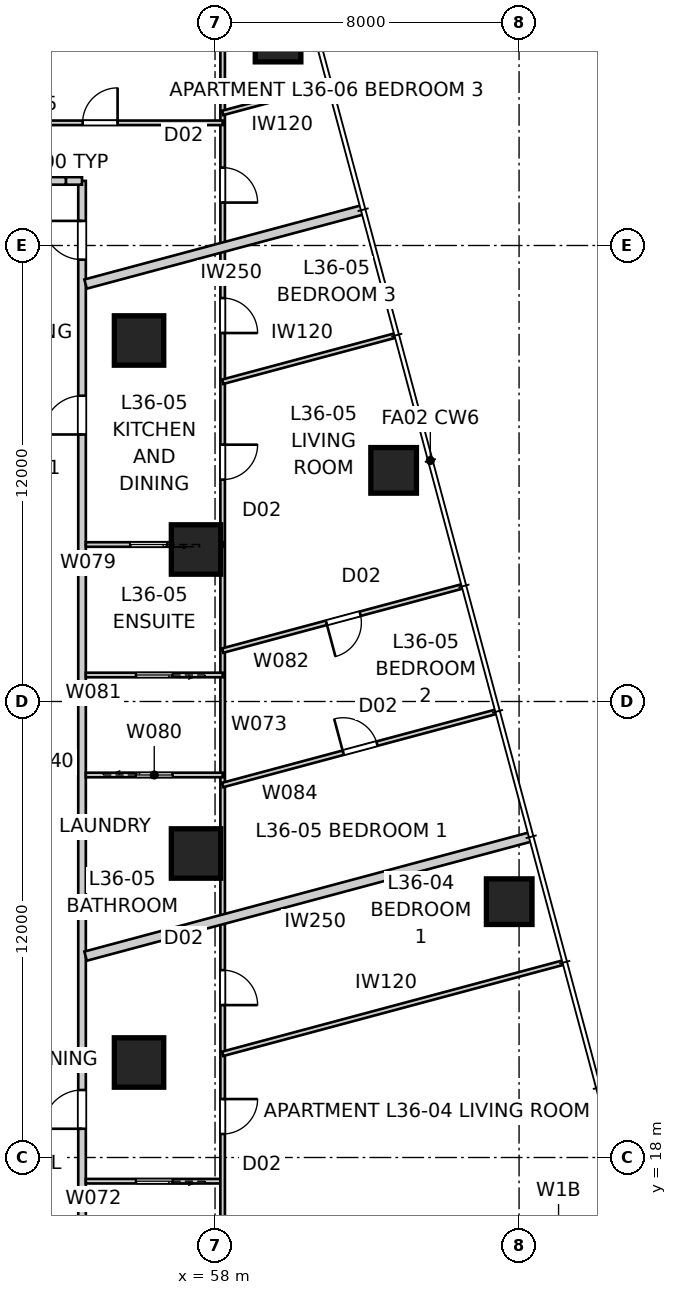
"""IFC4 building model, lengths in metres.
Left out: names, types, materials, properties, quantities, classifications, styles, units other than length and angle.
Written with IfcOpenShell. Run it as: python <this file> out.ifc"""

import sys

from ifc_helpers import new_model, si_unit, direction, frame, frame_2d, origin, origin_2d, place, context, subcontext, project, spatial, rectangle, extrude, element, fill, save


model = new_model("IFC4")
c1 = context("Model", 3, precision=1e-05, world=origin(), true_north=direction((0.0, 1.0)))
c2 = subcontext(c1, "Body", "Model", "MODEL_VIEW")
j1 = project(units=[si_unit("LENGTHUNIT", "METRE"), si_unit("PLANEANGLEUNIT", "RADIAN")], contexts=[c1])
p1 = place(None, origin())
s1 = spatial("IfcSite", under=j1, at=p1, CompositionType="ELEMENT")
p2 = place(p1, origin())
s2 = spatial("IfcBuilding", under=s1, at=p2, CompositionType="ELEMENT")
p3 = place(p2, frame((0.0, 0.0, 132.0)))
s3 = spatial("IfcBuildingStorey", under=s2, at=p3, CompositionType="ELEMENT", Elevation=132.0)
for number, where, z_axis, x_axis in (
    (1, (65.74, 24.733, 0.0), (0.0, 0.0, 1.0), (1.0, 0.0, 0.0)),
    (2, (62.699, 36.082, 0.0), (0.0, 0.0, 1.0), (1.0, 0.0, 0.0)),
    (3, (59.658, 47.432, 0.0), (0.0, 0.0, 1.0), (1.0, 0.0, 0.0)),
):
    element("IfcColumn", number, at=place(p3, frame(where, z_axis=z_axis, x_axis=x_axis)), inside=s3, PredefinedType="COLUMN", context=c2, shape_type="SweptSolid", body=[
        extrude(rectangle(XDim=1.2, YDim=1.2, at=origin_2d()), origin(), (0.0, 0.0, 1.0), 3.4),
    ])
for number, where, z_axis, x_axis in (
    (4, (57.5, 26.0, 0.0), (0.0, 0.0, 1.0), (1.0, 0.0, 0.0)),
    (5, (57.5, 34.0, 0.0), (0.0, 0.0, 1.0), (1.0, 0.0, 0.0)),
    (6, (56.0, 39.5, 0.0), (0.0, 0.0, 1.0), (1.0, 0.0, 0.0)),
    (7, (56.0, 20.5, 0.0), (0.0, 0.0, 1.0), (1.0, 0.0, 0.0)),
):
    element("IfcColumn", number, at=place(p3, frame(where, z_axis=z_axis, x_axis=x_axis)), inside=s3, PredefinedType="COLUMN", context=c2, shape_type="SweptSolid", body=[
        extrude(rectangle(XDim=1.3, YDim=1.3, at=origin_2d()), origin(), (0.0, 0.0, 1.0), 3.4),
    ])
p4 = place(p3, frame((65.107, 15.504, 0.0), z_axis=(0.0, 0.0, 1.0), x_axis=(0.965934430412, 0.258786931944, 0.0)))
e8 = element("IfcWall", 8, at=p4, inside=s3, PredefinedType="SOLIDWALL", context=c2, shape_type="SweptSolid", body=[
    extrude(rectangle(XDim=4.0, YDim=0.2, at=frame_2d((2.0, 0.0))), origin(), (0.0, 0.0, 1.0), 3.25),
])
p5 = place(p4, frame((1.0, 0.0, 0.45)))
e9 = element("IfcOpeningElement", 9, at=p5, cuts=e8, PredefinedType="OPENING", context=c2, shape_type="SweptSolid", body=[
    extrude(rectangle(XDim=2.0, YDim=1.8, at=frame_2d((1.0, 0.9))), frame((0.0, 0.11, 0.0), z_axis=(0.0, -1.0, 0.0), x_axis=(1.0, 0.0, 0.0)), (0.0, 0.0, 1.0), 0.22),
])
p6 = place(p3, frame((54.5, 15.5, 0.0), z_axis=(0.0, 0.0, 1.0), x_axis=(0.0, 1.0, 0.0)))
e10 = element("IfcWall", 10, at=p6, inside=s3, PredefinedType="PARTITIONING", context=c2, shape_type="SweptSolid", body=[
    extrude(rectangle(XDim=28.2, YDim=0.2, at=frame_2d((14.1, 0.0))), origin(), (0.0, 0.0, 1.0), 3.25),
])
p7 = place(p6, frame((21.527, 0.0, 0.0)))
e11 = element("IfcOpeningElement", 11, at=p7, cuts=e10, PredefinedType="OPENING", context=c2, shape_type="SweptSolid", body=[
    extrude(rectangle(XDim=1.02, YDim=2.34, at=frame_2d((0.51, 1.17))), frame((0.0, 0.11, 0.0), z_axis=(0.0, -1.0, 0.0), x_axis=(1.0, 0.0, 0.0)), (0.0, 0.0, 1.0), 0.22),
])
p8 = place(p6, frame((3.256, 0.0, 0.0)))
e12 = element("IfcOpeningElement", 12, at=p8, cuts=e10, PredefinedType="OPENING", context=c2, shape_type="SweptSolid", body=[
    extrude(rectangle(XDim=1.02, YDim=2.1, at=frame_2d((0.51, 1.05))), frame((0.0, 0.11, 0.0), z_axis=(0.0, -1.0, 0.0), x_axis=(1.0, 0.0, 0.0)), (0.0, 0.0, 1.0), 0.22),
])
p9 = place(p6, frame((26.127, 0.0, 0.0)))
e13 = element("IfcOpeningElement", 13, at=p9, cuts=e10, PredefinedType="OPENING", context=c2, shape_type="SweptSolid", body=[
    extrude(rectangle(XDim=1.02, YDim=2.34, at=frame_2d((0.51, 1.17))), frame((0.0, 0.11, 0.0), z_axis=(0.0, -1.0, 0.0), x_axis=(1.0, 0.0, 0.0)), (0.0, 0.0, 1.0), 0.22),
])
p10 = place(p3, frame((54.5, 43.7, 0.0), z_axis=(0.0, 0.0, 1.0), x_axis=(-1.0, 0.0, 0.0)))
e14 = element("IfcWall", 14, at=p10, inside=s3, PredefinedType="PARTITIONING", context=c2, shape_type="SweptSolid", body=[
    extrude(rectangle(XDim=0.426, YDim=0.2, at=frame_2d((0.213, 0.0))), origin(), (0.0, 0.0, 1.0), 3.25),
])
p11 = place(p3, frame((54.074, 43.7, 0.0), z_axis=(0.0, 0.0, 1.0), x_axis=(-1.0, 0.0, 0.0)))
e15 = element("IfcWall", 15, at=p11, inside=s3, PredefinedType="PARTITIONING", context=c2, shape_type="SweptSolid", body=[
    extrude(rectangle(XDim=1.554, YDim=0.2, at=frame_2d((0.777, 0.0))), origin(), (0.0, 0.0, 1.0), 2.721),
])
p12 = place(p3, frame((66.318, 26.44, 0.0), z_axis=(0.0, 0.0, 1.0), x_axis=(-0.965924438766, -0.258824223352, 0.0)))
e16 = element("IfcWall", 16, at=p12, inside=s3, PredefinedType="PARTITIONING", context=c2, shape_type="SweptSolid", body=[
    extrude(rectangle(XDim=12.138, YDim=0.25, at=frame_2d((6.069, 0.0))), origin(), (0.0, 0.0, 1.0), 3.25),
])
p13 = place(p3, frame((61.896, 42.942, 0.0), z_axis=(0.0, 0.0, 1.0), x_axis=(-0.965924988656, -0.258822171171, 0.0)))
e17 = element("IfcWall", 17, at=p13, inside=s3, PredefinedType="PARTITIONING", context=c2, shape_type="SweptSolid", body=[
    extrude(rectangle(XDim=7.56, YDim=0.25, at=frame_2d((3.78, 0.0))), origin(), (0.0, 0.0, 1.0), 3.25),
])
p14 = place(p3, frame((58.2, 17.377, 0.0), z_axis=(0.0, 0.0, 1.0), x_axis=(-1.0, 0.0, 0.0)))
e18 = element("IfcWall", 18, at=p14, inside=s3, PredefinedType="PARTITIONING", context=c2, shape_type="SweptSolid", body=[
    extrude(rectangle(XDim=3.6, YDim=0.12, at=frame_2d((1.8, 0.0))), origin(), (0.0, 0.0, 1.0), 3.25),
])
p15 = place(p14, frame((1.32, 0.0, 0.0)))
e19 = element("IfcOpeningElement", 19, at=p15, cuts=e18, PredefinedType="OPENING", context=c2, shape_type="SweptSolid", body=[
    extrude(rectangle(XDim=0.96, YDim=2.1, at=frame_2d((0.48, 1.05))), frame((0.0, 0.07, 0.0), z_axis=(0.0, -1.0, 0.0), x_axis=(1.0, 0.0, 0.0)), (0.0, 0.0, 1.0), 0.14),
])
p16 = place(p3, frame((58.2, 48.2, 0.0), z_axis=(0.0, 0.0, 1.0), x_axis=(0.0, -1.0, 0.0)))
e20 = element("IfcWall", 20, at=p16, inside=s3, PredefinedType="PARTITIONING", context=c2, shape_type="SweptSolid", body=[
    extrude(rectangle(XDim=33.512, YDim=0.12, at=frame_2d((16.756, 0.0))), origin(), (0.0, 0.0, 1.0), 2.637),
])
p17 = place(p16, frame((11.441, 0.0, 0.0)))
e21 = element("IfcOpeningElement", 21, at=p17, cuts=e20, PredefinedType="OPENING", context=c2, shape_type="SweptSolid", body=[
    extrude(rectangle(XDim=0.92, YDim=2.34, at=frame_2d((0.46, 1.17))), frame((0.0, 0.07, 0.0), z_axis=(0.0, -1.0, 0.0), x_axis=(1.0, 0.0, 0.0)), (0.0, 0.0, 1.0), 0.14),
])
p18 = place(p16, frame((7.583, 0.0, 0.0)))
e22 = element("IfcOpeningElement", 22, at=p18, cuts=e20, PredefinedType="OPENING", context=c2, shape_type="SweptSolid", body=[
    extrude(rectangle(XDim=0.92, YDim=2.34, at=frame_2d((0.46, 1.17))), frame((0.0, 0.07, 0.0), z_axis=(0.0, -1.0, 0.0), x_axis=(1.0, 0.0, 0.0)), (0.0, 0.0, 1.0), 0.14),
])
p19 = place(p16, frame((25.269, 0.0, 0.0)))
e23 = element("IfcOpeningElement", 23, at=p19, cuts=e20, PredefinedType="OPENING", context=c2, shape_type="SweptSolid", body=[
    extrude(rectangle(XDim=0.92, YDim=2.34, at=frame_2d((0.46, 1.17))), frame((0.0, 0.07, 0.0), z_axis=(0.0, -1.0, 0.0), x_axis=(1.0, 0.0, 0.0)), (0.0, 0.0, 1.0), 0.14),
])
p20 = place(p16, frame((28.662, 0.0, 0.0)))
e24 = element("IfcOpeningElement", 24, at=p20, cuts=e20, PredefinedType="OPENING", context=c2, shape_type="SweptSolid", body=[
    extrude(rectangle(XDim=0.92, YDim=2.34, at=frame_2d((0.46, 1.17))), frame((0.0, 0.07, 0.0), z_axis=(0.0, -1.0, 0.0), x_axis=(1.0, 0.0, 0.0)), (0.0, 0.0, 1.0), 0.14),
])
p21 = place(p16, frame((4.15, 0.0, 0.0)))
e25 = element("IfcOpeningElement", 25, at=p21, cuts=e20, PredefinedType="OPENING", context=c2, shape_type="SweptSolid", body=[
    extrude(rectangle(XDim=0.92, YDim=2.34, at=frame_2d((0.46, 1.17))), frame((0.0, 0.07, 0.0), z_axis=(0.0, -1.0, 0.0), x_axis=(1.0, 0.0, 0.0)), (0.0, 0.0, 1.0), 0.14),
])
p22 = place(p3, frame((58.2, 20.728, 0.0), z_axis=(0.0, 0.0, 1.0), x_axis=(0.965925974596, 0.258818491613, 0.0)))
e26 = element("IfcWall", 26, at=p22, inside=s3, PredefinedType="PARTITIONING", context=c2, shape_type="SweptSolid", body=[
    extrude(rectangle(XDim=9.28, YDim=0.12, at=frame_2d((4.64, 0.0))), origin(), (0.0, 0.0, 1.0), 2.721),
])
p23 = place(p3, frame((58.2, 34.131, 0.0), z_axis=(0.0, 0.0, 1.0), x_axis=(-1.0, 0.0, 0.0)))
e27 = element("IfcWall", 27, at=p23, inside=s3, PredefinedType="PARTITIONING", context=c2, shape_type="SweptSolid", body=[
    extrude(rectangle(XDim=3.6, YDim=0.12, at=frame_2d((1.8, 0.0))), origin(), (0.0, 0.0, 1.0), 3.25),
])
p24 = place(p23, frame((1.47, 0.0, 0.0)))
e28 = element("IfcOpeningElement", 28, at=p24, cuts=e27, PredefinedType="OPENING", context=c2, shape_type="SweptSolid", body=[
    extrude(rectangle(XDim=0.96, YDim=2.1, at=frame_2d((0.48, 1.05))), frame((0.0, 0.07, 0.0), z_axis=(0.0, -1.0, 0.0), x_axis=(1.0, 0.0, 0.0)), (0.0, 0.0, 1.0), 0.14),
])
p25 = place(p3, frame((54.6, 28.066, 0.0), z_axis=(0.0, 0.0, 1.0), x_axis=(1.0, 0.0, 0.0)))
e29 = element("IfcWall", 29, at=p25, inside=s3, PredefinedType="PARTITIONING", context=c2, shape_type="SweptSolid", body=[
    extrude(rectangle(XDim=3.6, YDim=0.12, at=frame_2d((1.8, 0.0))), origin(), (0.0, 0.0, 1.0), 3.25),
])
p26 = place(p25, frame((1.32, 0.0, 0.0)))
e30 = element("IfcOpeningElement", 30, at=p26, cuts=e29, PredefinedType="OPENING", context=c2, shape_type="SweptSolid", body=[
    extrude(rectangle(XDim=0.96, YDim=2.1, at=frame_2d((0.48, 1.05))), frame((0.0, 0.07, 0.0), z_axis=(0.0, -1.0, 0.0), x_axis=(1.0, 0.0, 0.0)), (0.0, 0.0, 1.0), 0.14),
])
p27 = place(p3, frame((58.2, 30.698, 0.0), z_axis=(0.0, 0.0, 1.0), x_axis=(-1.0, 0.0, 0.0)))
e31 = element("IfcWall", 31, at=p27, inside=s3, PredefinedType="PARTITIONING", context=c2, shape_type="SweptSolid", body=[
    extrude(rectangle(XDim=3.6, YDim=0.12, at=frame_2d((1.8, 0.0))), origin(), (0.0, 0.0, 1.0), 3.25),
])
p28 = place(p27, frame((1.32, 0.0, 0.0)))
e32 = element("IfcOpeningElement", 32, at=p28, cuts=e31, PredefinedType="OPENING", context=c2, shape_type="SweptSolid", body=[
    extrude(rectangle(XDim=0.96, YDim=2.1, at=frame_2d((0.48, 1.05))), frame((0.0, 0.07, 0.0), z_axis=(0.0, -1.0, 0.0), x_axis=(1.0, 0.0, 0.0)), (0.0, 0.0, 1.0), 0.14),
])
p29 = place(p3, frame((64.511, 33.031, 0.0), z_axis=(0.0, 0.0, 1.0), x_axis=(-0.96591852682, -0.258846285554, 0.0)))
e33 = element("IfcWall", 33, at=p29, inside=s3, PredefinedType="PARTITIONING", context=c2, shape_type="SweptSolid", body=[
    extrude(rectangle(XDim=6.533, YDim=0.12, at=frame_2d((3.267, 0.0))), origin(), (0.0, 0.0, 1.0), 3.25),
])
p30 = place(p29, frame((2.787, 0.0, 0.0)))
e34 = element("IfcOpeningElement", 34, at=p30, cuts=e33, PredefinedType="OPENING", context=c2, shape_type="SweptSolid", body=[
    extrude(rectangle(XDim=0.92, YDim=2.34, at=frame_2d((0.46, 1.17))), frame((0.0, 0.07, 0.0), z_axis=(0.0, -1.0, 0.0), x_axis=(1.0, 0.0, 0.0)), (0.0, 0.0, 1.0), 0.14),
])
p31 = place(p3, frame((58.2, 38.414, 0.0), z_axis=(0.0, 0.0, 1.0), x_axis=(0.965928353663, 0.258809612631, 0.0)))
e35 = element("IfcWall", 35, at=p31, inside=s3, PredefinedType="PARTITIONING", context=c2, shape_type="SweptSolid", body=[
    extrude(rectangle(XDim=4.702, YDim=0.12, at=frame_2d((2.351, 0.0))), origin(), (0.0, 0.0, 1.0), 3.25),
])
p32 = place(p3, frame((58.2, 27.802, 0.0), z_axis=(0.0, 0.0, 1.0), x_axis=(0.965925814813, 0.258819087933, 0.0)))
e36 = element("IfcWall", 36, at=p32, inside=s3, PredefinedType="PARTITIONING", context=c2, shape_type="SweptSolid", body=[
    extrude(rectangle(XDim=7.449, YDim=0.12, at=frame_2d((3.725, 0.0))), origin(), (0.0, 0.0, 1.0), 3.25),
])
p33 = place(p32, frame((3.284, 0.0, 0.0)))
e37 = element("IfcOpeningElement", 37, at=p33, cuts=e36, PredefinedType="OPENING", context=c2, shape_type="SweptSolid", body=[
    extrude(rectangle(XDim=0.92, YDim=2.34, at=frame_2d((0.46, 1.17))), frame((0.0, 0.07, 0.0), z_axis=(0.0, -1.0, 0.0), x_axis=(1.0, 0.0, 0.0)), (0.0, 0.0, 1.0), 0.14),
])
p34 = place(p3, frame((51.751, 45.228, 0.0), z_axis=(0.0, 0.0, 1.0), x_axis=(1.0, 0.0, 0.0)))
e38 = element("IfcWall", 38, at=p34, inside=s3, PredefinedType="PARTITIONING", context=c2, shape_type="SweptSolid", body=[
    extrude(rectangle(XDim=6.449, YDim=0.12, at=frame_2d((3.225, 0.0))), origin(), (0.0, 0.0, 1.0), 3.25),
])
p35 = place(p34, frame((2.764, 0.0, 0.0)))
e39 = element("IfcOpeningElement", 39, at=p35, cuts=e38, PredefinedType="OPENING", context=c2, shape_type="SweptSolid", body=[
    extrude(rectangle(XDim=0.92, YDim=2.34, at=frame_2d((0.46, 1.17))), frame((0.0, 0.07, 0.0), z_axis=(0.0, -1.0, 0.0), x_axis=(1.0, 0.0, 0.0)), (0.0, 0.0, 1.0), 0.14),
])
p36 = place(p3, frame((60.974, 46.231, 0.0), z_axis=(0.0, 0.0, 1.0), x_axis=(-0.965929456086, -0.258805498136, 0.0)))
e40 = element("IfcWall", 40, at=p36, inside=s3, PredefinedType="PARTITIONING", context=c2, shape_type="SweptSolid", body=[
    extrude(rectangle(XDim=2.872, YDim=0.12, at=frame_2d((1.436, 0.0))), origin(), (0.0, 0.0, 1.0), 3.25),
])
p37 = place(p7, origin())
e41 = element("IfcDoor", 41, at=p37, inside=s3, OperationType="SINGLE_SWING_LEFT", PredefinedType="DOOR", context=c2, shape_type="SweptSolid", body=[
    extrude(rectangle(XDim=1.02, YDim=2.34, at=frame_2d((0.51, 1.17))), frame((0.0, 0.025, 0.0), z_axis=(0.0, -1.0, 0.0), x_axis=(1.0, 0.0, 0.0)), (0.0, 0.0, 1.0), 0.05),
])
fill(e11, e41)
p38 = place(p8, origin())
e42 = element("IfcDoor", 42, at=p38, inside=s3, OperationType="SINGLE_SWING_LEFT", PredefinedType="DOOR", context=c2, shape_type="SweptSolid", body=[
    extrude(rectangle(XDim=1.02, YDim=2.1, at=frame_2d((0.51, 1.05))), frame((0.0, 0.025, 0.0), z_axis=(0.0, -1.0, 0.0), x_axis=(1.0, 0.0, 0.0)), (0.0, 0.0, 1.0), 0.05),
])
fill(e12, e42)
p39 = place(p9, origin())
e43 = element("IfcDoor", 43, at=p39, inside=s3, OperationType="SINGLE_SWING_RIGHT", PredefinedType="DOOR", context=c2, shape_type="SweptSolid", body=[
    extrude(rectangle(XDim=1.02, YDim=2.34, at=frame_2d((0.51, 1.17))), frame((0.0, 0.025, 0.0), z_axis=(0.0, -1.0, 0.0), x_axis=(1.0, 0.0, 0.0)), (0.0, 0.0, 1.0), 0.05),
])
fill(e13, e43)
p40 = place(p17, origin())
e44 = element("IfcDoor", 44, at=p40, inside=s3, OperationType="SINGLE_SWING_LEFT", PredefinedType="DOOR", context=c2, shape_type="SweptSolid", body=[
    extrude(rectangle(XDim=0.92, YDim=2.34, at=frame_2d((0.46, 1.17))), frame((0.0, 0.025, 0.0), z_axis=(0.0, -1.0, 0.0), x_axis=(1.0, 0.0, 0.0)), (0.0, 0.0, 1.0), 0.05),
])
fill(e21, e44)
p41 = place(p24, origin())
e45 = element("IfcDoor", 45, at=p41, inside=s3, OperationType="SLIDING_TO_LEFT", PredefinedType="DOOR", context=c2, shape_type="SweptSolid", body=[
    extrude(rectangle(XDim=0.96, YDim=2.1, at=frame_2d((0.48, 1.05))), frame((0.0, 0.025, 0.0), z_axis=(0.0, -1.0, 0.0), x_axis=(1.0, 0.0, 0.0)), (0.0, 0.0, 1.0), 0.05),
])
fill(e28, e45)
p42 = place(p18, origin())
e46 = element("IfcDoor", 46, at=p42, inside=s3, OperationType="SINGLE_SWING_RIGHT", PredefinedType="DOOR", context=c2, shape_type="SweptSolid", body=[
    extrude(rectangle(XDim=0.92, YDim=2.34, at=frame_2d((0.46, 1.17))), frame((0.0, 0.025, 0.0), z_axis=(0.0, -1.0, 0.0), x_axis=(1.0, 0.0, 0.0)), (0.0, 0.0, 1.0), 0.05),
])
fill(e22, e46)
p43 = place(p15, origin())
e47 = element("IfcDoor", 47, at=p43, inside=s3, OperationType="SLIDING_TO_LEFT", PredefinedType="DOOR", context=c2, shape_type="SweptSolid", body=[
    extrude(rectangle(XDim=0.96, YDim=2.1, at=frame_2d((0.48, 1.05))), frame((0.0, 0.025, 0.0), z_axis=(0.0, -1.0, 0.0), x_axis=(1.0, 0.0, 0.0)), (0.0, 0.0, 1.0), 0.05),
])
fill(e19, e47)
p44 = place(p19, origin())
e48 = element("IfcDoor", 48, at=p44, inside=s3, OperationType="SINGLE_SWING_RIGHT", PredefinedType="DOOR", context=c2, shape_type="SweptSolid", body=[
    extrude(rectangle(XDim=0.92, YDim=2.34, at=frame_2d((0.46, 1.17))), frame((0.0, 0.025, 0.0), z_axis=(0.0, -1.0, 0.0), x_axis=(1.0, 0.0, 0.0)), (0.0, 0.0, 1.0), 0.05),
])
fill(e23, e48)
p45 = place(p20, origin())
e49 = element("IfcDoor", 49, at=p45, inside=s3, OperationType="SINGLE_SWING_LEFT", PredefinedType="DOOR", context=c2, shape_type="SweptSolid", body=[
    extrude(rectangle(XDim=0.92, YDim=2.34, at=frame_2d((0.46, 1.17))), frame((0.0, 0.025, 0.0), z_axis=(0.0, -1.0, 0.0), x_axis=(1.0, 0.0, 0.0)), (0.0, 0.0, 1.0), 0.05),
])
fill(e24, e49)
p46 = place(p35, origin())
e50 = element("IfcDoor", 50, at=p46, inside=s3, OperationType="SINGLE_SWING_RIGHT", PredefinedType="DOOR", context=c2, shape_type="SweptSolid", body=[
    extrude(rectangle(XDim=0.92, YDim=2.34, at=frame_2d((0.46, 1.17))), frame((0.0, 0.025, 0.0), z_axis=(0.0, -1.0, 0.0), x_axis=(1.0, 0.0, 0.0)), (0.0, 0.0, 1.0), 0.05),
])
fill(e39, e50)
p47 = place(p21, origin())
e51 = element("IfcDoor", 51, at=p47, inside=s3, OperationType="SINGLE_SWING_RIGHT", PredefinedType="DOOR", context=c2, shape_type="SweptSolid", body=[
    extrude(rectangle(XDim=0.92, YDim=2.34, at=frame_2d((0.46, 1.17))), frame((0.0, 0.025, 0.0), z_axis=(0.0, -1.0, 0.0), x_axis=(1.0, 0.0, 0.0)), (0.0, 0.0, 1.0), 0.05),
])
fill(e25, e51)
p48 = place(p30, origin())
e52 = element("IfcDoor", 52, at=p48, inside=s3, OperationType="SINGLE_SWING_RIGHT", PredefinedType="DOOR", context=c2, shape_type="SweptSolid", body=[
    extrude(rectangle(XDim=0.92, YDim=2.34, at=frame_2d((0.46, 1.17))), frame((0.0, 0.025, 0.0), z_axis=(0.0, -1.0, 0.0), x_axis=(1.0, 0.0, 0.0)), (0.0, 0.0, 1.0), 0.05),
])
fill(e34, e52)
p49 = place(p28, origin())
e53 = element("IfcDoor", 53, at=p49, inside=s3, OperationType="SLIDING_TO_LEFT", PredefinedType="DOOR", context=c2, shape_type="SweptSolid", body=[
    extrude(rectangle(XDim=0.96, YDim=2.1, at=frame_2d((0.48, 1.05))), frame((0.0, 0.025, 0.0), z_axis=(0.0, -1.0, 0.0), x_axis=(1.0, 0.0, 0.0)), (0.0, 0.0, 1.0), 0.05),
])
fill(e32, e53)
p50 = place(p26, origin())
e54 = element("IfcDoor", 54, at=p50, inside=s3, OperationType="SLIDING_TO_LEFT", PredefinedType="DOOR", context=c2, shape_type="SweptSolid", body=[
    extrude(rectangle(XDim=0.96, YDim=2.1, at=frame_2d((0.48, 1.05))), frame((0.0, 0.025, 0.0), z_axis=(0.0, -1.0, 0.0), x_axis=(1.0, 0.0, 0.0)), (0.0, 0.0, 1.0), 0.05),
])
fill(e30, e54)
p51 = place(p33, origin())
e55 = element("IfcDoor", 55, at=p51, inside=s3, OperationType="SINGLE_SWING_LEFT", PredefinedType="DOOR", context=c2, shape_type="SweptSolid", body=[
    extrude(rectangle(XDim=0.92, YDim=2.34, at=frame_2d((0.46, 1.17))), frame((0.0, 0.025, 0.0), z_axis=(0.0, -1.0, 0.0), x_axis=(1.0, 0.0, 0.0)), (0.0, 0.0, 1.0), 0.05),
])
fill(e37, e55)
save(model, sys.argv[1])
